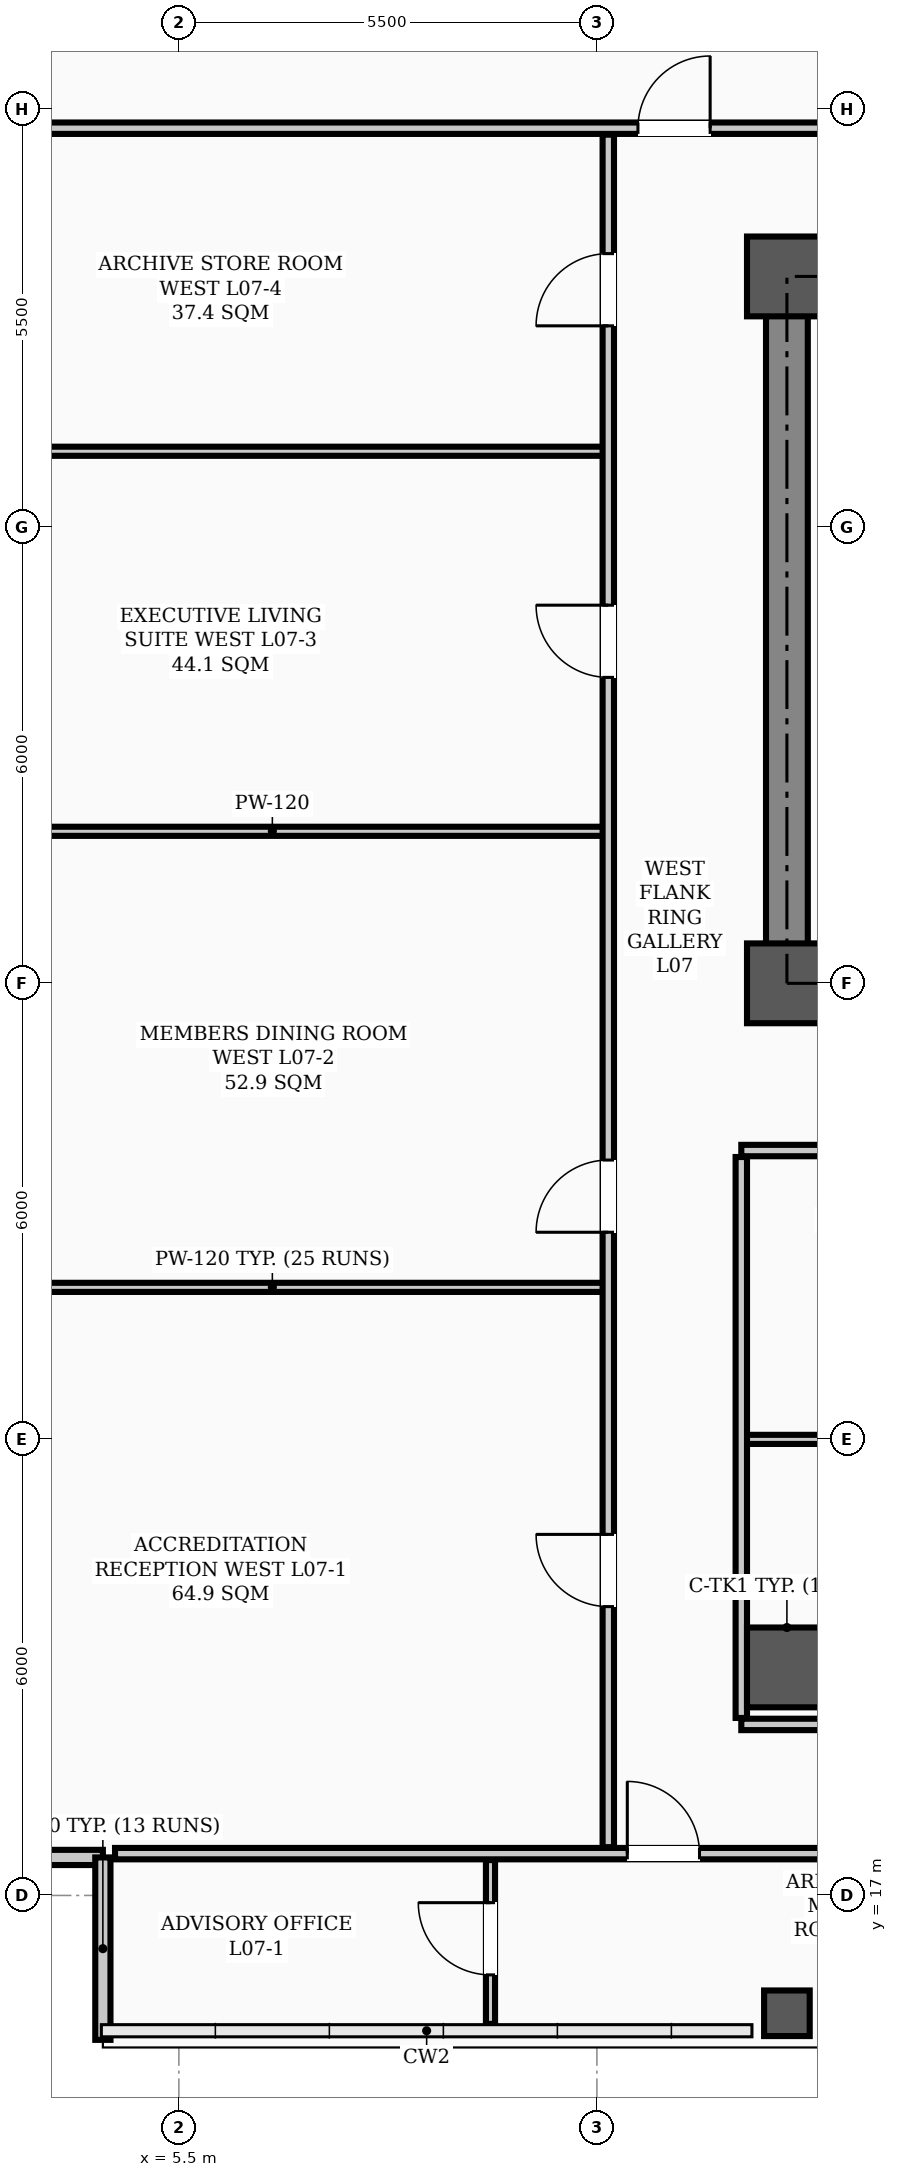
"""IFC4 building model, lengths in metres.
Left out: names, types, materials, properties, quantities, classifications, styles, units other than length and angle.
Written with IfcOpenShell. Run it as: python <this file> out.ifc"""

import sys

from ifc_helpers import new_model, si_unit, direction, frame, frame_2d, origin, origin_2d, place, context, subcontext, project, spatial, rectangle, hollow_rectangle, extrude, element, fill, save


model = new_model("IFC4")
c1 = context("Model", 3, precision=1e-05, world=origin(), true_north=direction((0.0, 1.0)))
c2 = subcontext(c1, "Body", "Model", "MODEL_VIEW")
j1 = project(units=[si_unit("LENGTHUNIT", "METRE"), si_unit("PLANEANGLEUNIT", "RADIAN")], contexts=[c1])
p1 = place(None, origin())
s1 = spatial("IfcSite", under=j1, at=p1, CompositionType="ELEMENT")
p2 = place(p1, origin())
s2 = spatial("IfcBuilding", under=s1, at=p2, CompositionType="ELEMENT")
p3 = place(p2, frame((0.0, 0.0, 30.4)))
s3 = spatial("IfcBuildingStorey", under=s2, at=p3, CompositionType="ELEMENT", Elevation=30.4)
for number, where, z_axis, x_axis in (
    (1, (13.5, 29.0, 0.0), (0.0, 0.0, 1.0), (1.0, 0.0, 0.0)),
    (2, (13.5, 38.3, 0.0), (0.0, 0.0, 1.0), (1.0, 0.0, 0.0)),
    (3, (13.5, 20.0, 0.0), (0.0, 0.0, 1.0), (1.0, 0.0, 0.0)),
):
    element("IfcColumn", number, at=place(p3, frame(where, z_axis=z_axis, x_axis=x_axis)), inside=s3, PredefinedType="COLUMN", context=c2, shape_type="SweptSolid", body=[
        extrude(hollow_rectangle(XDim=1.05, YDim=1.05, WallThickness=0.038, InnerFilletRadius=0.019, OuterFilletRadius=0.057, at=origin_2d()), origin(), (0.0, 0.0, 1.0), 3.9),
    ])
p4 = place(p3, frame((13.5, 15.45, 0.0), z_axis=(0.0, 0.0, 1.0), x_axis=(1.0, 0.0, 0.0)))
e4 = element("IfcColumn", 4, at=p4, inside=s3, PredefinedType="COLUMN", context=c2, shape_type="SweptSolid", body=[
    extrude(hollow_rectangle(XDim=0.6, YDim=0.6, WallThickness=0.026, InnerFilletRadius=0.013, OuterFilletRadius=0.039, at=origin_2d()), origin(), (0.0, 0.0, 1.0), 3.9),
])
for number, where, z_axis, x_axis in (
    (5, (2.1, 17.5, 0.0), (0.0, 0.0, 1.0), (1.0, 0.0, 0.0)),
    (6, (4.5, 17.5, 0.0), (0.0, 0.0, 1.0), (0.0, -1.0, 0.0)),
):
    element("IfcWall", number, at=place(p3, frame(where, z_axis=z_axis, x_axis=x_axis)), inside=s3, PredefinedType="PARAPET", context=c2, shape_type="SweptSolid", body=[
        extrude(rectangle(XDim=2.4, YDim=0.2, at=frame_2d((1.2, 0.0))), origin(), (0.0, 0.0, 1.0), 1.2),
    ])
p5 = place(p3, frame((13.5, 29.0, 0.0), z_axis=(0.0, 0.0, 1.0), x_axis=(1.0, 0.0, 0.0)))
e7 = element("IfcWall", 7, at=p5, inside=s3, PredefinedType="SHEAR", context=c2, shape_type="SweptSolid", body=[
    extrude(rectangle(XDim=30.5, YDim=0.55, at=frame_2d((15.25, 0.0))), origin(), (0.0, 0.0, 1.0), 3.72),
])
p6 = place(p5, frame((1.75, 0.0, 0.0)))
e8 = element("IfcOpeningElement", 8, at=p6, cuts=e7, PredefinedType="OPENING", context=c2, shape_type="SweptSolid", body=[
    extrude(rectangle(XDim=1.1, YDim=2.08, at=frame_2d((0.55, 1.04))), frame((0.0, 0.285, 0.0), z_axis=(0.0, -1.0, 0.0), x_axis=(1.0, 0.0, 0.0)), (0.0, 0.0, 1.0), 0.57),
])
p7 = place(p5, frame((26.7, 0.0, 0.0)))
e9 = element("IfcOpeningElement", 9, at=p7, cuts=e7, PredefinedType="OPENING", context=c2, shape_type="SweptSolid", body=[
    extrude(rectangle(XDim=1.1, YDim=2.08, at=frame_2d((0.55, 1.04))), frame((0.0, 0.285, 0.0), z_axis=(0.0, -1.0, 0.0), x_axis=(1.0, 0.0, 0.0)), (0.0, 0.0, 1.0), 0.57),
])
p8 = place(p5, frame((6.8, 0.0, 0.0)))
e10 = element("IfcOpeningElement", 10, at=p8, cuts=e7, PredefinedType="OPENING", context=c2, shape_type="SweptSolid", body=[
    extrude(rectangle(XDim=1.1, YDim=2.08, at=frame_2d((0.55, 1.04))), frame((0.0, 0.285, 0.0), z_axis=(0.0, -1.0, 0.0), x_axis=(1.0, 0.0, 0.0)), (0.0, 0.0, 1.0), 0.57),
])
p9 = place(p5, frame((13.2, 0.0, 0.0)))
e11 = element("IfcOpeningElement", 11, at=p9, cuts=e7, PredefinedType="OPENING", context=c2, shape_type="SweptSolid", body=[
    extrude(rectangle(XDim=1.6, YDim=2.08, at=frame_2d((0.8, 1.04))), frame((0.0, 0.285, 0.0), z_axis=(0.0, -1.0, 0.0), x_axis=(1.0, 0.0, 0.0)), (0.0, 0.0, 1.0), 0.57),
])
p10 = place(p5, frame((19.6, 0.0, 0.0)))
e12 = element("IfcOpeningElement", 12, at=p10, cuts=e7, PredefinedType="OPENING", context=c2, shape_type="SweptSolid", body=[
    extrude(rectangle(XDim=0.9, YDim=2.08, at=frame_2d((0.45, 1.04))), frame((0.0, 0.285, 0.0), z_axis=(0.0, -1.0, 0.0), x_axis=(1.0, 0.0, 0.0)), (0.0, 0.0, 1.0), 0.57),
])
p11 = place(p5, frame((21.6, 0.0, 0.0)))
e13 = element("IfcOpeningElement", 13, at=p11, cuts=e7, PredefinedType="OPENING", context=c2, shape_type="SweptSolid", body=[
    extrude(rectangle(XDim=0.9, YDim=2.08, at=frame_2d((0.45, 1.04))), frame((0.0, 0.285, 0.0), z_axis=(0.0, -1.0, 0.0), x_axis=(1.0, 0.0, 0.0)), (0.0, 0.0, 1.0), 0.57),
])
p12 = place(p3, frame((13.5, 38.3, 0.0), z_axis=(0.0, 0.0, 1.0), x_axis=(1.0, 0.0, 0.0)))
e14 = element("IfcWall", 14, at=p12, inside=s3, PredefinedType="SHEAR", context=c2, shape_type="SweptSolid", body=[
    extrude(rectangle(XDim=30.5, YDim=0.55, at=frame_2d((15.25, 0.0))), origin(), (0.0, 0.0, 1.0), 3.72),
])
p13 = place(p3, frame((13.5, 29.35, 0.0), z_axis=(0.0, 0.0, 1.0), x_axis=(0.0, 1.0, 0.0)))
e15 = element("IfcWall", 15, at=p13, inside=s3, PredefinedType="SHEAR", context=c2, shape_type="SweptSolid", body=[
    extrude(rectangle(XDim=8.6, YDim=0.55, at=frame_2d((4.3, 0.0))), origin(), (0.0, 0.0, 1.0), 3.72),
])
p14 = place(p3, frame((12.9, 26.8, 0.0), z_axis=(0.0, 0.0, 1.0), x_axis=(1.0, 0.0, 0.0)))
e16 = element("IfcWall", 16, at=p14, inside=s3, PredefinedType="PARTITIONING", context=c2, shape_type="SweptSolid", body=[
    extrude(rectangle(XDim=31.7, YDim=0.15, at=frame_2d((15.85, 0.0))), origin(), (0.0, 0.0, 1.0), 3.1),
])
p15 = place(p14, frame((13.6, 0.0, 0.0)))
e17 = element("IfcOpeningElement", 17, at=p15, cuts=e16, PredefinedType="OPENING", context=c2, shape_type="SweptSolid", body=[
    extrude(rectangle(XDim=1.6, YDim=2.08, at=frame_2d((0.8, 1.04))), frame((0.0, 0.085, 0.0), z_axis=(0.0, -1.0, 0.0), x_axis=(1.0, 0.0, 0.0)), (0.0, 0.0, 1.0), 0.17),
])
p16 = place(p14, frame((1.775, 0.0, 0.0)))
e18 = element("IfcOpeningElement", 18, at=p16, cuts=e16, PredefinedType="OPENING", context=c2, shape_type="SweptSolid", body=[
    extrude(rectangle(XDim=0.95, YDim=2.08, at=frame_2d((0.475, 1.04))), frame((0.0, 0.085, 0.0), z_axis=(0.0, -1.0, 0.0), x_axis=(1.0, 0.0, 0.0)), (0.0, 0.0, 1.0), 0.17),
])
p17 = place(p14, frame((6.225, 0.0, 0.0)))
e19 = element("IfcOpeningElement", 19, at=p17, cuts=e16, PredefinedType="OPENING", context=c2, shape_type="SweptSolid", body=[
    extrude(rectangle(XDim=0.95, YDim=2.08, at=frame_2d((0.475, 1.04))), frame((0.0, 0.085, 0.0), z_axis=(0.0, -1.0, 0.0), x_axis=(1.0, 0.0, 0.0)), (0.0, 0.0, 1.0), 0.17),
])
p18 = place(p14, frame((10.625, 0.0, 0.0)))
e20 = element("IfcOpeningElement", 20, at=p18, cuts=e16, PredefinedType="OPENING", context=c2, shape_type="SweptSolid", body=[
    extrude(rectangle(XDim=0.95, YDim=2.08, at=frame_2d((0.475, 1.04))), frame((0.0, 0.085, 0.0), z_axis=(0.0, -1.0, 0.0), x_axis=(1.0, 0.0, 0.0)), (0.0, 0.0, 1.0), 0.17),
])
p19 = place(p14, frame((16.075, 0.0, 0.0)))
e21 = element("IfcOpeningElement", 21, at=p19, cuts=e16, PredefinedType="OPENING", context=c2, shape_type="SweptSolid", body=[
    extrude(rectangle(XDim=0.95, YDim=2.08, at=frame_2d((0.475, 1.04))), frame((0.0, 0.085, 0.0), z_axis=(0.0, -1.0, 0.0), x_axis=(1.0, 0.0, 0.0)), (0.0, 0.0, 1.0), 0.17),
])
p20 = place(p14, frame((21.925, 0.0, 0.0)))
e22 = element("IfcOpeningElement", 22, at=p20, cuts=e16, PredefinedType="OPENING", context=c2, shape_type="SweptSolid", body=[
    extrude(rectangle(XDim=0.95, YDim=2.08, at=frame_2d((0.475, 1.04))), frame((0.0, 0.085, 0.0), z_axis=(0.0, -1.0, 0.0), x_axis=(1.0, 0.0, 0.0)), (0.0, 0.0, 1.0), 0.17),
])
p21 = place(p14, frame((28.625, 0.0, 0.0)))
e23 = element("IfcOpeningElement", 23, at=p21, cuts=e16, PredefinedType="OPENING", context=c2, shape_type="SweptSolid", body=[
    extrude(rectangle(XDim=0.95, YDim=2.08, at=frame_2d((0.475, 1.04))), frame((0.0, 0.085, 0.0), z_axis=(0.0, -1.0, 0.0), x_axis=(1.0, 0.0, 0.0)), (0.0, 0.0, 1.0), 0.17),
])
p22 = place(p3, frame((4.66, 17.55, 0.0), z_axis=(0.0, 0.0, 1.0), x_axis=(1.0, 0.0, 0.0)))
e24 = element("IfcWall", 24, at=p22, inside=s3, PredefinedType="PARTITIONING", context=c2, shape_type="SweptSolid", body=[
    extrude(rectangle(XDim=44.68, YDim=0.15, at=frame_2d((22.34, 0.0))), origin(), (0.0, 0.0, 1.0), 3.1),
])
p23 = place(p22, frame((6.74, 0.0, 0.0)))
e25 = element("IfcOpeningElement", 25, at=p23, cuts=e24, PredefinedType="OPENING", context=c2, shape_type="SweptSolid", body=[
    extrude(rectangle(XDim=0.95, YDim=2.08, at=frame_2d((0.475, 1.04))), frame((0.0, 0.085, 0.0), z_axis=(0.0, -1.0, 0.0), x_axis=(1.0, 0.0, 0.0)), (0.0, 0.0, 1.0), 0.17),
])
p24 = place(p22, frame((13.865, 0.0, 0.0)))
e26 = element("IfcOpeningElement", 26, at=p24, cuts=e24, PredefinedType="OPENING", context=c2, shape_type="SweptSolid", body=[
    extrude(rectangle(XDim=0.95, YDim=2.08, at=frame_2d((0.475, 1.04))), frame((0.0, 0.085, 0.0), z_axis=(0.0, -1.0, 0.0), x_axis=(1.0, 0.0, 0.0)), (0.0, 0.0, 1.0), 0.17),
])
p25 = place(p22, frame((28.765, 0.0, 0.0)))
e27 = element("IfcOpeningElement", 27, at=p25, cuts=e24, PredefinedType="OPENING", context=c2, shape_type="SweptSolid", body=[
    extrude(rectangle(XDim=0.95, YDim=2.08, at=frame_2d((0.475, 1.04))), frame((0.0, 0.085, 0.0), z_axis=(0.0, -1.0, 0.0), x_axis=(1.0, 0.0, 0.0)), (0.0, 0.0, 1.0), 0.17),
])
p26 = place(p22, frame((34.465, 0.0, 0.0)))
e28 = element("IfcOpeningElement", 28, at=p26, cuts=e24, PredefinedType="OPENING", context=c2, shape_type="SweptSolid", body=[
    extrude(rectangle(XDim=0.95, YDim=2.08, at=frame_2d((0.475, 1.04))), frame((0.0, 0.085, 0.0), z_axis=(0.0, -1.0, 0.0), x_axis=(1.0, 0.0, 0.0)), (0.0, 0.0, 1.0), 0.17),
])
p27 = place(p22, frame((39.24, 0.0, 0.0)))
e29 = element("IfcOpeningElement", 29, at=p27, cuts=e24, PredefinedType="OPENING", context=c2, shape_type="SweptSolid", body=[
    extrude(rectangle(XDim=0.95, YDim=2.08, at=frame_2d((0.475, 1.04))), frame((0.0, 0.085, 0.0), z_axis=(0.0, -1.0, 0.0), x_axis=(1.0, 0.0, 0.0)), (0.0, 0.0, 1.0), 0.17),
])
p28 = place(p3, frame((12.9, 19.25, 0.0), z_axis=(0.0, 0.0, 1.0), x_axis=(1.0, 0.0, 0.0)))
e30 = element("IfcWall", 30, at=p28, inside=s3, PredefinedType="PARTITIONING", context=c2, shape_type="SweptSolid", body=[
    extrude(rectangle(XDim=13.3, YDim=0.15, at=frame_2d((6.65, 0.0))), origin(), (0.0, 0.0, 1.0), 3.1),
])
p29 = place(p28, frame((1.775, 0.0, 0.0)))
e31 = element("IfcOpeningElement", 31, at=p29, cuts=e30, PredefinedType="OPENING", context=c2, shape_type="SweptSolid", body=[
    extrude(rectangle(XDim=0.95, YDim=2.08, at=frame_2d((0.475, 1.04))), frame((0.0, 0.085, 0.0), z_axis=(0.0, -1.0, 0.0), x_axis=(1.0, 0.0, 0.0)), (0.0, 0.0, 1.0), 0.17),
])
p30 = place(p28, frame((6.225, 0.0, 0.0)))
e32 = element("IfcOpeningElement", 32, at=p30, cuts=e30, PredefinedType="OPENING", context=c2, shape_type="SweptSolid", body=[
    extrude(rectangle(XDim=0.95, YDim=2.08, at=frame_2d((0.475, 1.04))), frame((0.0, 0.085, 0.0), z_axis=(0.0, -1.0, 0.0), x_axis=(1.0, 0.0, 0.0)), (0.0, 0.0, 1.0), 0.17),
])
p31 = place(p28, frame((12.175, 0.0, 0.0)))
e33 = element("IfcOpeningElement", 33, at=p31, cuts=e30, PredefinedType="OPENING", context=c2, shape_type="SweptSolid", body=[
    extrude(rectangle(XDim=0.95, YDim=2.08, at=frame_2d((0.475, 1.04))), frame((0.0, 0.085, 0.0), z_axis=(0.0, -1.0, 0.0), x_axis=(1.0, 0.0, 0.0)), (0.0, 0.0, 1.0), 0.17),
])
p32 = place(p3, frame((12.9, 23.0, 0.0), z_axis=(0.0, 0.0, 1.0), x_axis=(1.0, 0.0, 0.0)))
e34 = element("IfcWall", 34, at=p32, inside=s3, PredefinedType="PARTITIONING", context=c2, shape_type="SweptSolid", body=[
    extrude(rectangle(XDim=4.5, YDim=0.12, at=frame_2d((2.25, 0.0))), origin(), (0.0, 0.0, 1.0), 3.1),
])
for number, where, z_axis, x_axis in (
    (35, (2.31, 25.0, 0.0), (0.0, 0.0, 1.0), (1.0, 0.0, 0.0)),
    (36, (2.31, 31.0, 0.0), (0.0, 0.0, 1.0), (1.0, 0.0, 0.0)),
    (37, (2.31, 36.0, 0.0), (0.0, 0.0, 1.0), (1.0, 0.0, 0.0)),
):
    element("IfcWall", number, at=place(p3, frame(where, z_axis=z_axis, x_axis=x_axis)), inside=s3, PredefinedType="PARTITIONING", context=c2, shape_type="SweptSolid", body=[
        extrude(rectangle(XDim=8.84, YDim=0.12, at=frame_2d((4.42, 0.0))), origin(), (0.0, 0.0, 1.0), 3.212),
    ])
p33 = place(p3, frame((2.31, 40.25, 0.0), z_axis=(0.0, 0.0, 1.0), x_axis=(1.0, 0.0, 0.0)))
e38 = element("IfcWall", 38, at=p33, inside=s3, PredefinedType="PARTITIONING", context=c2, shape_type="SweptSolid", body=[
    extrude(rectangle(XDim=49.38, YDim=0.15, at=frame_2d((24.69, 0.0))), origin(), (0.0, 0.0, 1.0), 3.1),
])
p34 = place(p33, frame((9.23, 0.0, 0.0)))
e39 = element("IfcOpeningElement", 39, at=p34, cuts=e38, PredefinedType="OPENING", context=c2, shape_type="SweptSolid", body=[
    extrude(rectangle(XDim=0.95, YDim=2.08, at=frame_2d((0.475, 1.04))), frame((0.0, 0.085, 0.0), z_axis=(0.0, -1.0, 0.0), x_axis=(1.0, 0.0, 0.0)), (0.0, 0.0, 1.0), 0.17),
])
p35 = place(p33, frame((18.715, 0.0, 0.0)))
e40 = element("IfcOpeningElement", 40, at=p35, cuts=e38, PredefinedType="OPENING", context=c2, shape_type="SweptSolid", body=[
    extrude(rectangle(XDim=0.95, YDim=2.08, at=frame_2d((0.475, 1.04))), frame((0.0, 0.085, 0.0), z_axis=(0.0, -1.0, 0.0), x_axis=(1.0, 0.0, 0.0)), (0.0, 0.0, 1.0), 0.17),
])
p36 = place(p33, frame((26.715, 0.0, 0.0)))
e41 = element("IfcOpeningElement", 41, at=p36, cuts=e38, PredefinedType="OPENING", context=c2, shape_type="SweptSolid", body=[
    extrude(rectangle(XDim=0.95, YDim=2.08, at=frame_2d((0.475, 1.04))), frame((0.0, 0.085, 0.0), z_axis=(0.0, -1.0, 0.0), x_axis=(1.0, 0.0, 0.0)), (0.0, 0.0, 1.0), 0.17),
])
p37 = place(p33, frame((31.765, 0.0, 0.0)))
e42 = element("IfcOpeningElement", 42, at=p37, cuts=e38, PredefinedType="OPENING", context=c2, shape_type="SweptSolid", body=[
    extrude(rectangle(XDim=0.95, YDim=2.08, at=frame_2d((0.475, 1.04))), frame((0.0, 0.085, 0.0), z_axis=(0.0, -1.0, 0.0), x_axis=(1.0, 0.0, 0.0)), (0.0, 0.0, 1.0), 0.17),
])
p38 = place(p33, frame((42.7, 0.0, 0.0)))
e43 = element("IfcOpeningElement", 43, at=p38, cuts=e38, PredefinedType="OPENING", context=c2, shape_type="SweptSolid", body=[
    extrude(rectangle(XDim=0.95, YDim=2.08, at=frame_2d((0.475, 1.04))), frame((0.0, 0.085, 0.0), z_axis=(0.0, -1.0, 0.0), x_axis=(1.0, 0.0, 0.0)), (0.0, 0.0, 1.0), 0.17),
])
p39 = place(p3, frame((11.15, 17.635, 0.0), z_axis=(0.0, 0.0, 1.0), x_axis=(0.0, 1.0, 0.0)))
e44 = element("IfcWall", 44, at=p39, inside=s3, PredefinedType="PARTITIONING", context=c2, shape_type="SweptSolid", body=[
    extrude(rectangle(XDim=22.53, YDim=0.15, at=frame_2d((11.265, 0.0))), origin(), (0.0, 0.0, 1.0), 3.0),
])
p40 = place(p39, frame((3.165, 0.0, 0.0)))
e45 = element("IfcOpeningElement", 45, at=p40, cuts=e44, PredefinedType="OPENING", context=c2, shape_type="SweptSolid", body=[
    extrude(rectangle(XDim=0.95, YDim=2.08, at=frame_2d((0.475, 1.04))), frame((0.0, 0.085, 0.0), z_axis=(0.0, -1.0, 0.0), x_axis=(1.0, 0.0, 0.0)), (0.0, 0.0, 1.0), 0.17),
])
p41 = place(p39, frame((8.09, 0.0, 0.0)))
e46 = element("IfcOpeningElement", 46, at=p41, cuts=e44, PredefinedType="OPENING", context=c2, shape_type="SweptSolid", body=[
    extrude(rectangle(XDim=0.95, YDim=2.08, at=frame_2d((0.475, 1.04))), frame((0.0, 0.085, 0.0), z_axis=(0.0, -1.0, 0.0), x_axis=(1.0, 0.0, 0.0)), (0.0, 0.0, 1.0), 0.17),
])
p42 = place(p39, frame((15.39, 0.0, 0.0)))
e47 = element("IfcOpeningElement", 47, at=p42, cuts=e44, PredefinedType="OPENING", context=c2, shape_type="SweptSolid", body=[
    extrude(rectangle(XDim=0.95, YDim=2.08, at=frame_2d((0.475, 1.04))), frame((0.0, 0.085, 0.0), z_axis=(0.0, -1.0, 0.0), x_axis=(1.0, 0.0, 0.0)), (0.0, 0.0, 1.0), 0.17),
])
p43 = place(p39, frame((20.015, 0.0, 0.0)))
e48 = element("IfcOpeningElement", 48, at=p43, cuts=e44, PredefinedType="OPENING", context=c2, shape_type="SweptSolid", body=[
    extrude(rectangle(XDim=0.95, YDim=2.08, at=frame_2d((0.475, 1.04))), frame((0.0, 0.085, 0.0), z_axis=(0.0, -1.0, 0.0), x_axis=(1.0, 0.0, 0.0)), (0.0, 0.0, 1.0), 0.17),
])
p44 = place(p3, frame((12.9, 19.335, 0.0), z_axis=(0.0, 0.0, 1.0), x_axis=(0.0, 1.0, 0.0)))
e49 = element("IfcWall", 49, at=p44, inside=s3, PredefinedType="PARTITIONING", context=c2, shape_type="SweptSolid", body=[
    extrude(rectangle(XDim=7.38, YDim=0.15, at=frame_2d((3.69, 0.0))), origin(), (0.0, 0.0, 1.0), 3.0),
])
p45 = place(p3, frame((9.6, 15.31, 0.0), z_axis=(0.0, 0.0, 1.0), x_axis=(0.0, 1.0, 0.0)))
e50 = element("IfcWall", 50, at=p45, inside=s3, PredefinedType="PARTITIONING", context=c2, shape_type="SweptSolid", body=[
    extrude(rectangle(XDim=2.155, YDim=0.12, at=frame_2d((1.078, 0.0))), origin(), (0.0, 0.0, 1.0), 3.72),
])
p46 = place(p45, frame((0.645, 0.0, 0.0)))
e51 = element("IfcOpeningElement", 51, at=p46, cuts=e50, PredefinedType="OPENING", context=c2, shape_type="SweptSolid", body=[
    extrude(rectangle(XDim=0.95, YDim=2.08, at=frame_2d((0.475, 1.04))), frame((0.0, 0.07, 0.0), z_axis=(0.0, -1.0, 0.0), x_axis=(1.0, 0.0, 0.0)), (0.0, 0.0, 1.0), 0.14),
])
p47 = place(p46, origin())
e52 = element("IfcDoor", 52, at=p47, inside=s3, OperationType="SINGLE_SWING_RIGHT", PredefinedType="DOOR", context=c2, shape_type="SweptSolid", body=[
    extrude(rectangle(XDim=0.95, YDim=2.08, at=frame_2d((0.475, 1.04))), frame((0.0, 0.025, 0.0), z_axis=(0.0, -1.0, 0.0), x_axis=(1.0, 0.0, 0.0)), (0.0, 0.0, 1.0), 0.05),
])
fill(e51, e52)
p48 = place(p23, origin())
e53 = element("IfcDoor", 53, at=p48, inside=s3, OperationType="SINGLE_SWING_LEFT", PredefinedType="DOOR", context=c2, shape_type="SweptSolid", body=[
    extrude(rectangle(XDim=0.95, YDim=2.08, at=frame_2d((0.475, 1.04))), frame((0.0, 0.025, 0.0), z_axis=(0.0, -1.0, 0.0), x_axis=(1.0, 0.0, 0.0)), (0.0, 0.0, 1.0), 0.05),
])
fill(e25, e53)
p49 = place(p40, origin())
e54 = element("IfcDoor", 54, at=p49, inside=s3, OperationType="SINGLE_SWING_RIGHT", PredefinedType="DOOR", context=c2, shape_type="SweptSolid", body=[
    extrude(rectangle(XDim=0.95, YDim=2.08, at=frame_2d((0.475, 1.04))), frame((0.0, 0.025, 0.0), z_axis=(0.0, -1.0, 0.0), x_axis=(1.0, 0.0, 0.0)), (0.0, 0.0, 1.0), 0.05),
])
fill(e45, e54)
p50 = place(p41, origin())
e55 = element("IfcDoor", 55, at=p50, inside=s3, OperationType="SINGLE_SWING_LEFT", PredefinedType="DOOR", context=c2, shape_type="SweptSolid", body=[
    extrude(rectangle(XDim=0.95, YDim=2.08, at=frame_2d((0.475, 1.04))), frame((0.0, 0.025, 0.0), z_axis=(0.0, -1.0, 0.0), x_axis=(1.0, 0.0, 0.0)), (0.0, 0.0, 1.0), 0.05),
])
fill(e46, e55)
p51 = place(p42, origin())
e56 = element("IfcDoor", 56, at=p51, inside=s3, OperationType="SINGLE_SWING_RIGHT", PredefinedType="DOOR", context=c2, shape_type="SweptSolid", body=[
    extrude(rectangle(XDim=0.95, YDim=2.08, at=frame_2d((0.475, 1.04))), frame((0.0, 0.025, 0.0), z_axis=(0.0, -1.0, 0.0), x_axis=(1.0, 0.0, 0.0)), (0.0, 0.0, 1.0), 0.05),
])
fill(e47, e56)
p52 = place(p43, origin())
e57 = element("IfcDoor", 57, at=p52, inside=s3, OperationType="SINGLE_SWING_LEFT", PredefinedType="DOOR", context=c2, shape_type="SweptSolid", body=[
    extrude(rectangle(XDim=0.95, YDim=2.08, at=frame_2d((0.475, 1.04))), frame((0.0, 0.025, 0.0), z_axis=(0.0, -1.0, 0.0), x_axis=(1.0, 0.0, 0.0)), (0.0, 0.0, 1.0), 0.05),
])
fill(e48, e57)
p53 = place(p34, origin())
e58 = element("IfcDoor", 58, at=p53, inside=s3, OperationType="SINGLE_SWING_RIGHT", PredefinedType="DOOR", context=c2, shape_type="SweptSolid", body=[
    extrude(rectangle(XDim=0.95, YDim=2.08, at=frame_2d((0.475, 1.04))), frame((0.0, 0.025, 0.0), z_axis=(0.0, -1.0, 0.0), x_axis=(1.0, 0.0, 0.0)), (0.0, 0.0, 1.0), 0.05),
])
fill(e39, e58)
save(model, sys.argv[1])
